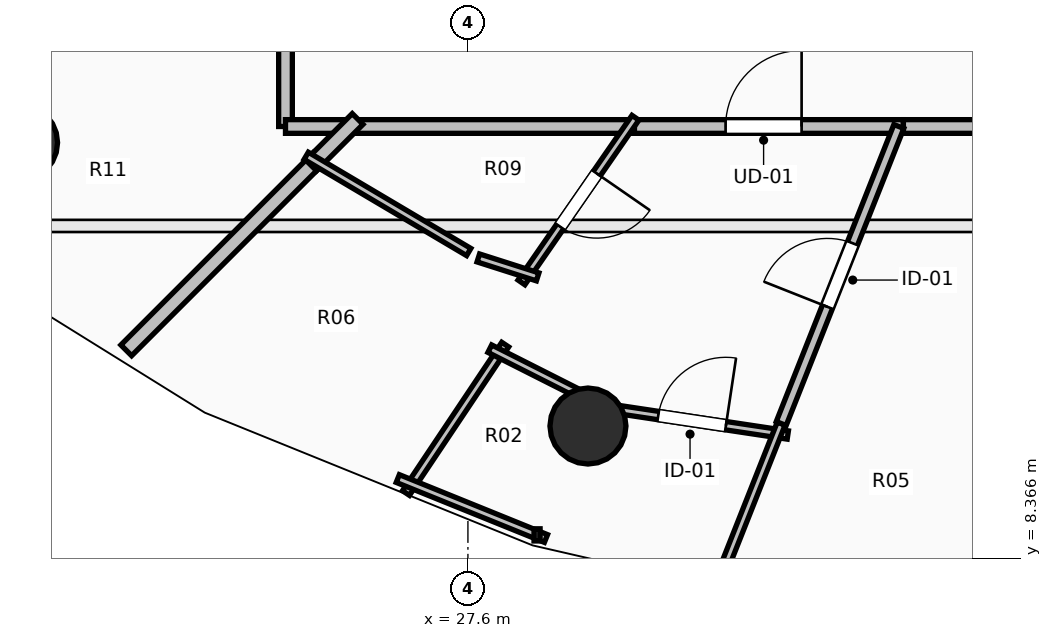
"""IFC4 building model, lengths in metres.
Left out: names, types, materials, properties, quantities, classifications, styles, units other than length and angle.
Written with IfcOpenShell. Run it as: python <this file> out.ifc"""

import sys

from ifc_helpers import new_model, si_unit, direction, frame, frame_2d, origin, origin_2d, place, context, subcontext, project, spatial, rectangle, circle, extrude, element, fill, save


model = new_model("IFC4")
c1 = context("Model", 3, precision=1e-05, world=origin(), true_north=direction((0.0, 1.0)))
c2 = subcontext(c1, "Body", "Model", "MODEL_VIEW")
j1 = project(units=[si_unit("LENGTHUNIT", "METRE"), si_unit("PLANEANGLEUNIT", "RADIAN")], contexts=[c1])
p1 = place(None, origin())
s1 = spatial("IfcSite", under=j1, at=p1, CompositionType="ELEMENT")
p2 = place(p1, origin())
s2 = spatial("IfcBuilding", under=s1, at=p2, CompositionType="ELEMENT")
p3 = place(p2, frame((0.0, 0.0, 136.1)))
s3 = spatial("IfcBuildingStorey", under=s2, at=p3, CompositionType="ELEMENT", Elevation=136.1)
for number, where, z_axis, x_axis in (
    (1, (21.701, 13.838, 0.0), (0.0, 0.0, 1.0), (-0.707, -0.707, 0.0)),
    (2, (29.179, 10.109, 0.0), (0.0, 0.0, 1.0), (-0.383, -0.924, 0.0)),
):
    element("IfcColumn", number, at=place(p3, frame(where, z_axis=z_axis, x_axis=x_axis)), inside=s3, PredefinedType="COLUMN", context=c2, shape_type="SweptSolid", body=[
        extrude(circle(Radius=0.5, at=origin_2d()), origin(), (0.0, 0.0, 1.0), 3.5),
    ])
p4 = place(p3, frame((25.2, 17.228, 0.0), z_axis=(0.0, 0.0, 1.0), x_axis=(0.0, -1.0, 0.0)))
e3 = element("IfcWall", 3, at=p4, inside=s3, PredefinedType="PARTITIONING", context=c2, shape_type="SweptSolid", body=[
    extrude(rectangle(XDim=3.178, YDim=0.18, at=frame_2d((1.589, 0.0))), origin(), (0.0, 0.0, 1.0), 2.432),
])
p5 = place(p4, frame((1.164, 0.0, 0.0)))
e4 = element("IfcOpeningElement", 4, at=p5, cuts=e3, PredefinedType="OPENING", context=c2, shape_type="SweptSolid", body=[
    extrude(rectangle(XDim=0.85, YDim=2.1, at=frame_2d((0.425, 1.05))), frame((0.0, 0.105, 0.0), z_axis=(0.0, -1.0, 0.0), x_axis=(1.0, 0.0, 0.0)), (0.0, 0.0, 1.0), 0.21),
])
p6 = place(p3, frame((25.2, 14.05, 0.0), z_axis=(0.0, 0.0, 1.0), x_axis=(1.0, 0.0, 0.0)))
e5 = element("IfcWall", 5, at=p6, inside=s3, PredefinedType="PARTITIONING", context=c2, shape_type="SweptSolid", body=[
    extrude(rectangle(XDim=0.91, YDim=0.18, at=frame_2d((0.455, 0.0))), origin(), (0.0, 0.0, 1.0), 2.874),
])
p7 = place(p3, frame((29.651, 14.05, 0.0), z_axis=(0.0, 0.0, 1.0), x_axis=(1.0, 0.0, 0.0)))
e6 = element("IfcWall", 6, at=p7, inside=s3, PredefinedType="PARTITIONING", context=c2, shape_type="SweptSolid", body=[
    extrude(rectangle(XDim=3.678, YDim=0.18, at=frame_2d((1.839, 0.0))), origin(), (0.0, 0.0, 1.0), 2.922),
])
p8 = place(p7, frame((1.339, 0.0, 0.0)))
e7 = element("IfcOpeningElement", 7, at=p8, cuts=e6, PredefinedType="OPENING", context=c2, shape_type="SweptSolid", body=[
    extrude(rectangle(XDim=1.0, YDim=2.15, at=frame_2d((0.5, 1.075))), frame((0.0, 0.105, 0.0), z_axis=(0.0, -1.0, 0.0), x_axis=(1.0, 0.0, 0.0)), (0.0, 0.0, 1.0), 0.21),
])
p9 = place(p3, frame((25.97, 14.05, 0.0), z_axis=(0.0, 0.0, 1.0), x_axis=(1.0, 0.0, 0.0)))
e8 = element("IfcWall", 8, at=p9, inside=s3, PredefinedType="PARTITIONING", context=c2, shape_type="SweptSolid", body=[
    extrude(rectangle(XDim=3.821, YDim=0.18, at=frame_2d((1.911, 0.0))), origin(), (0.0, 0.0, 1.0), 2.432),
])
p10 = place(p3, frame((33.329, 14.05, 0.0), z_axis=(0.0, 0.0, 1.0), x_axis=(1.0, 0.0, 0.0)))
e9 = element("IfcWall", 9, at=p10, inside=s3, PredefinedType="PARTITIONING", context=c2, shape_type="SweptSolid", body=[
    extrude(rectangle(XDim=2.451, YDim=0.18, at=frame_2d((1.226, 0.0))), origin(), (0.0, 0.0, 1.0), 2.922),
])
p11 = place(p3, frame((19.627, 13.514, 0.0), z_axis=(0.0, 0.0, 1.0), x_axis=(0.827101009155, 0.562053307663, 0.0)))
e10 = element("IfcWall", 10, at=p11, inside=s3, PredefinedType="PARTITIONING", context=c2, shape_type="SweptSolid", body=[
    extrude(rectangle(XDim=6.738, YDim=0.14, at=frame_2d((3.369, 0.0))), origin(), (0.0, 0.0, 1.0), 2.432),
])
p12 = place(p3, frame((23.105, 11.105, 0.0), z_axis=(0.0, 0.0, 1.0), x_axis=(0.707106781187, 0.707106781187, 0.0)))
e11 = element("IfcWall", 11, at=p12, inside=s3, PredefinedType="PARTITIONING", context=c2, shape_type="SweptSolid", body=[
    extrude(rectangle(XDim=3.581, YDim=0.2, at=frame_2d((1.791, 0.0))), origin(), (0.0, 0.0, 1.0), 2.728),
])
p13 = place(p3, frame((25.538, 13.538, 0.0), z_axis=(0.0, 0.0, 1.0), x_axis=(0.707106781187, 0.707106781187, 0.0)))
e12 = element("IfcWall", 12, at=p13, inside=s3, PredefinedType="PARTITIONING", context=c2, shape_type="SweptSolid", body=[
    extrude(rectangle(XDim=0.864, YDim=0.2, at=frame_2d((0.432, 0.0))), origin(), (0.0, 0.0, 1.0), 2.874),
])
p14 = place(p3, frame((29.804, 14.165, 0.0), z_axis=(0.0, 0.0, 1.0), x_axis=(-0.569156972472, -0.822228885826, 0.0)))
e13 = element("IfcWall", 13, at=p14, inside=s3, PredefinedType="PARTITIONING", context=c2, shape_type="SweptSolid", body=[
    extrude(rectangle(XDim=2.635, YDim=0.11, at=frame_2d((1.317, 0.0))), origin(), (0.0, 0.0, 1.0), 2.432),
])
p15 = place(p14, frame((0.892, 0.0, 0.0)))
e14 = element("IfcOpeningElement", 14, at=p15, cuts=e13, PredefinedType="OPENING", context=c2, shape_type="SweptSolid", body=[
    extrude(rectangle(XDim=0.85, YDim=2.1, at=frame_2d((0.425, 1.05))), frame((0.0, 0.07, 0.0), z_axis=(0.0, -1.0, 0.0), x_axis=(1.0, 0.0, 0.0)), (0.0, 0.0, 1.0), 0.14),
])
p16 = place(p3, frame((28.517, 12.071, 0.0), z_axis=(0.0, 0.0, 1.0), x_axis=(-0.952627998304, 0.304137956932, 0.0)))
e15 = element("IfcWall", 15, at=p16, inside=s3, PredefinedType="PARTITIONING", context=c2, shape_type="SweptSolid", body=[
    extrude(rectangle(XDim=0.82, YDim=0.11, at=frame_2d((0.41, 0.0))), origin(), (0.0, 0.0, 1.0), 2.432),
])
p17 = place(p3, frame((27.611, 12.399, 0.0), z_axis=(0.0, 0.0, 1.0), x_axis=(-0.860546797705, 0.509371386082, 0.0)))
e16 = element("IfcWall", 16, at=p17, inside=s3, PredefinedType="PARTITIONING", context=c2, shape_type="SweptSolid", body=[
    extrude(rectangle(XDim=2.485, YDim=0.11, at=frame_2d((1.242, 0.0))), origin(), (0.0, 0.0, 1.0), 2.874),
])
p18 = place(p3, frame((26.785, 9.228, 0.0), z_axis=(0.0, 0.0, 1.0), x_axis=(0.555802936367, 0.831314077786, 0.0)))
e17 = element("IfcWall", 17, at=p18, inside=s3, PredefinedType="PARTITIONING", context=c2, shape_type="SweptSolid", body=[
    extrude(rectangle(XDim=2.349, YDim=0.11, at=frame_2d((1.175, 0.0))), origin(), (0.0, 0.0, 1.0), 2.728),
])
p19 = place(p3, frame((27.888, 11.127, 0.0), z_axis=(0.0, 0.0, 1.0), x_axis=(0.892534718882, -0.450978686403, 0.0)))
e18 = element("IfcWall", 18, at=p19, inside=s3, PredefinedType="PARTITIONING", context=c2, shape_type="SweptSolid", body=[
    extrude(rectangle(XDim=1.865, YDim=0.11, at=frame_2d((0.933, 0.0))), origin(), (0.0, 0.0, 1.0), 2.432),
])
p20 = place(p3, frame((29.29, 10.37, 0.0), z_axis=(0.0, 0.0, 1.0), x_axis=(0.988887788943, -0.148663851958, 0.0)))
e19 = element("IfcWall", 19, at=p20, inside=s3, PredefinedType="PARTITIONING", context=c2, shape_type="SweptSolid", body=[
    extrude(rectangle(XDim=2.547, YDim=0.11, at=frame_2d((1.273, 0.0))), origin(), (0.0, 0.0, 1.0), 3.24),
])
p21 = place(p20, frame((0.823, 0.0, 0.0)))
e20 = element("IfcOpeningElement", 20, at=p21, cuts=e19, PredefinedType="OPENING", context=c2, shape_type="SweptSolid", body=[
    extrude(rectangle(XDim=0.9, YDim=2.1, at=frame_2d((0.45, 1.05))), frame((0.0, 0.07, 0.0), z_axis=(0.0, -1.0, 0.0), x_axis=(1.0, 0.0, 0.0)), (0.0, 0.0, 1.0), 0.14),
])
p22 = place(p3, frame((31.721, 10.142, 0.0), z_axis=(0.0, 0.0, 1.0), x_axis=(-0.368016079814, -0.929819426017, 0.0)))
e21 = element("IfcWall", 21, at=p22, inside=s3, PredefinedType="PARTITIONING", context=c2, shape_type="SweptSolid", body=[
    extrude(rectangle(XDim=2.309, YDim=0.11, at=frame_2d((1.155, 0.0))), origin(), (0.0, 0.0, 1.0), 2.728),
])
p23 = place(p3, frame((26.677, 9.418, 0.0), z_axis=(0.0, 0.0, 1.0), x_axis=(0.926947774479, -0.375190382857, 0.0)))
e22 = element("IfcWall", 22, at=p23, inside=s3, PredefinedType="PARTITIONING", context=c2, shape_type="SweptSolid", body=[
    extrude(rectangle(XDim=2.103, YDim=0.11, at=frame_2d((1.052, 0.0))), origin(), (0.0, 0.0, 1.0), 3.24),
])
p24 = place(p3, frame((31.722, 10.142, 0.0), z_axis=(0.0, 0.0, 1.0), x_axis=(0.368143652048, 0.929768923688, 0.0)))
e23 = element("IfcWall", 23, at=p24, inside=s3, PredefinedType="PARTITIONING", context=c2, shape_type="SweptSolid", body=[
    extrude(rectangle(XDim=4.203, YDim=0.14, at=frame_2d((2.102, 0.0))), origin(), (0.0, 0.0, 1.0), 2.874),
])
p25 = place(p24, frame((1.652, 0.0, 0.0)))
e24 = element("IfcOpeningElement", 24, at=p25, cuts=e23, PredefinedType="OPENING", context=c2, shape_type="SweptSolid", body=[
    extrude(rectangle(XDim=0.9, YDim=2.1, at=frame_2d((0.45, 1.05))), frame((0.0, 0.085, 0.0), z_axis=(0.0, -1.0, 0.0), x_axis=(1.0, 0.0, 0.0)), (0.0, 0.0, 1.0), 0.17),
])
p26 = place(p8, origin())
e25 = element("IfcDoor", 25, at=p26, inside=s3, OperationType="SINGLE_SWING_RIGHT", PredefinedType="DOOR", context=c2, shape_type="SweptSolid", body=[
    extrude(rectangle(XDim=1.0, YDim=2.15, at=frame_2d((0.5, 1.075))), frame((0.0, 0.025, 0.0), z_axis=(0.0, -1.0, 0.0), x_axis=(1.0, 0.0, 0.0)), (0.0, 0.0, 1.0), 0.05),
])
fill(e7, e25)
p27 = place(p15, origin())
e26 = element("IfcDoor", 26, at=p27, inside=s3, OperationType="SINGLE_SWING_LEFT", PredefinedType="DOOR", context=c2, shape_type="SweptSolid", body=[
    extrude(rectangle(XDim=0.85, YDim=2.1, at=frame_2d((0.425, 1.05))), frame((0.0, 0.025, 0.0), z_axis=(0.0, -1.0, 0.0), x_axis=(1.0, 0.0, 0.0)), (0.0, 0.0, 1.0), 0.05),
])
fill(e14, e26)
p28 = place(p21, origin())
e27 = element("IfcDoor", 27, at=p28, inside=s3, OperationType="SINGLE_SWING_RIGHT", PredefinedType="DOOR", context=c2, shape_type="SweptSolid", body=[
    extrude(rectangle(XDim=0.9, YDim=2.1, at=frame_2d((0.45, 1.05))), frame((0.0, 0.025, 0.0), z_axis=(0.0, -1.0, 0.0), x_axis=(1.0, 0.0, 0.0)), (0.0, 0.0, 1.0), 0.05),
])
fill(e20, e27)
p29 = place(p25, origin())
e28 = element("IfcDoor", 28, at=p29, inside=s3, OperationType="SINGLE_SWING_LEFT", PredefinedType="DOOR", context=c2, shape_type="SweptSolid", body=[
    extrude(rectangle(XDim=0.9, YDim=2.1, at=frame_2d((0.45, 1.05))), frame((0.0, 0.025, 0.0), z_axis=(0.0, -1.0, 0.0), x_axis=(1.0, 0.0, 0.0)), (0.0, 0.0, 1.0), 0.05),
])
fill(e24, e28)
save(model, sys.argv[1])
